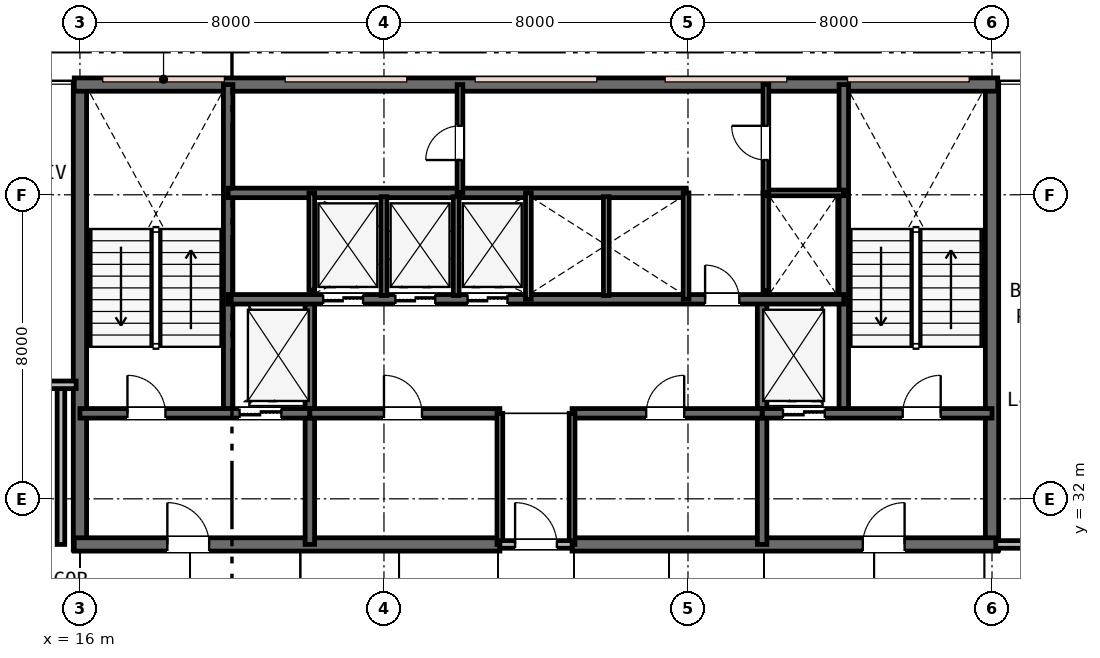
"""IFC4 building model, lengths in metres.
Left out: names, types, materials, properties, quantities, classifications, styles, units other than length and angle.
Written with IfcOpenShell. Run it as: python <this file> out.ifc"""

import sys

from ifc_helpers import new_model, si_unit, direction, frame, frame_2d, origin, place, context, subcontext, project, spatial, rectangle, extrude, element, fill, save


model = new_model("IFC4")
c1 = context("Model", 3, precision=1e-05, world=origin(), true_north=direction((0.0, 1.0)))
c2 = subcontext(c1, "Body", "Model", "MODEL_VIEW")
j1 = project(units=[si_unit("LENGTHUNIT", "METRE"), si_unit("PLANEANGLEUNIT", "RADIAN")], contexts=[c1])
p1 = place(None, origin())
s1 = spatial("IfcSite", under=j1, at=p1, CompositionType="ELEMENT")
p2 = place(p1, origin())
s2 = spatial("IfcBuilding", under=s1, at=p2, CompositionType="ELEMENT")
p3 = place(p2, frame((0.0, 0.0, 165.0)))
s3 = spatial("IfcBuildingStorey", under=s2, at=p3, CompositionType="ELEMENT", Elevation=165.0)
for number, where, z_axis, x_axis in (
    (1, (16.0, 30.65, 0.0), (0.0, 0.0, 1.0), (0.0, 1.0, 0.0)),
    (2, (40.0, 30.65, 0.0), (0.0, 0.0, 1.0), (0.0, 1.0, 0.0)),
):
    element("IfcWall", number, at=place(p3, frame(where, z_axis=z_axis, x_axis=x_axis)), inside=s3, PredefinedType="SHEAR", context=c2, shape_type="SweptSolid", body=[
        extrude(rectangle(XDim=12.3, YDim=0.35, at=frame_2d((6.15, 0.0))), origin(), (0.0, 0.0, 1.0), 3.6),
    ])
p4 = place(p3, frame((15.85, 42.9, 0.0), z_axis=(0.0, 0.0, 1.0), x_axis=(1.0, 0.0, 0.0)))
e3 = element("IfcWall", 3, at=p4, inside=s3, PredefinedType="SHEAR", context=c2, shape_type="SweptSolid", body=[
    extrude(rectangle(XDim=24.3, YDim=0.35, at=frame_2d((12.15, 0.0))), origin(), (0.0, 0.0, 1.0), 3.6),
])
p5 = place(p3, frame((15.85, 30.8, 0.0), z_axis=(0.0, 0.0, 1.0), x_axis=(1.0, 0.0, 0.0)))
e4 = element("IfcWall", 4, at=p5, inside=s3, PredefinedType="SHEAR", context=c2, shape_type="SweptSolid", body=[
    extrude(rectangle(XDim=11.2, YDim=0.35, at=frame_2d((5.6, 0.0))), origin(), (0.0, 0.0, 1.0), 3.6),
])
p6 = place(p5, frame((2.45, 0.0, 0.0)))
e5 = element("IfcOpeningElement", 5, at=p6, cuts=e4, PredefinedType="OPENING", context=c2, shape_type="SweptSolid", body=[
    extrude(rectangle(XDim=1.1, YDim=2.15, at=frame_2d((0.55, 1.075))), frame((0.0, 0.185, 0.0), z_axis=(0.0, -1.0, 0.0), x_axis=(1.0, 0.0, 0.0)), (0.0, 0.0, 1.0), 0.37),
])
p7 = place(p3, frame((28.95, 30.8, 0.0), z_axis=(0.0, 0.0, 1.0), x_axis=(1.0, 0.0, 0.0)))
e6 = element("IfcWall", 6, at=p7, inside=s3, PredefinedType="SHEAR", context=c2, shape_type="SweptSolid", body=[
    extrude(rectangle(XDim=11.2, YDim=0.35, at=frame_2d((5.6, 0.0))), origin(), (0.0, 0.0, 1.0), 3.6),
])
p8 = place(p7, frame((7.65, 0.0, 0.0)))
e7 = element("IfcOpeningElement", 7, at=p8, cuts=e6, PredefinedType="OPENING", context=c2, shape_type="SweptSolid", body=[
    extrude(rectangle(XDim=1.1, YDim=2.15, at=frame_2d((0.55, 1.075))), frame((0.0, 0.185, 0.0), z_axis=(0.0, -1.0, 0.0), x_axis=(1.0, 0.0, 0.0)), (0.0, 0.0, 1.0), 0.37),
])
for number, where, z_axis, x_axis in (
    (8, (19.9, 34.25, 0.0), (0.0, 0.0, 1.0), (0.0, 1.0, 0.0)),
    (9, (36.1, 34.25, 0.0), (0.0, 0.0, 1.0), (0.0, 1.0, 0.0)),
):
    element("IfcWall", number, at=place(p3, frame(where, z_axis=z_axis, x_axis=x_axis)), inside=s3, PredefinedType="SHEAR", context=c2, shape_type="SweptSolid", body=[
        extrude(rectangle(XDim=8.65, YDim=0.25, at=frame_2d((4.325, 0.0))), origin(), (0.0, 0.0, 1.0), 3.6),
    ])
for number, where, z_axis, x_axis in (
    (10, (22.05, 30.8, 0.0), (0.0, 0.0, 1.0), (0.0, 1.0, 0.0)),
    (11, (33.95, 30.8, 0.0), (0.0, 0.0, 1.0), (0.0, 1.0, 0.0)),
):
    element("IfcWall", number, at=place(p3, frame(where, z_axis=z_axis, x_axis=x_axis)), inside=s3, PredefinedType="SHEAR", context=c2, shape_type="SweptSolid", body=[
        extrude(rectangle(XDim=6.45, YDim=0.25, at=frame_2d((3.225, 0.0))), origin(), (0.0, 0.0, 1.0), 3.6),
    ])
p9 = place(p3, frame((16.0, 34.25, 0.0), z_axis=(0.0, 0.0, 1.0), x_axis=(1.0, 0.0, 0.0)))
e12 = element("IfcWall", 12, at=p9, inside=s3, PredefinedType="SHEAR", context=c2, shape_type="SweptSolid", body=[
    extrude(rectangle(XDim=6.05, YDim=0.25, at=frame_2d((3.025, 0.0))), origin(), (0.0, 0.0, 1.0), 3.6),
])
p10 = place(p9, frame((1.25, 0.0, 0.0)))
e13 = element("IfcOpeningElement", 13, at=p10, cuts=e12, PredefinedType="OPENING", context=c2, shape_type="SweptSolid", body=[
    extrude(rectangle(XDim=1.0, YDim=2.15, at=frame_2d((0.5, 1.075))), frame((0.0, 0.135, 0.0), z_axis=(0.0, -1.0, 0.0), x_axis=(1.0, 0.0, 0.0)), (0.0, 0.0, 1.0), 0.27),
])
p11 = place(p9, frame((4.2, 0.0, 0.0)))
e14 = element("IfcOpeningElement", 14, at=p11, cuts=e12, PredefinedType="OPENING", context=c2, shape_type="SweptSolid", body=[
    extrude(rectangle(XDim=1.1, YDim=2.15, at=frame_2d((0.55, 1.075))), frame((0.0, 0.135, 0.0), z_axis=(0.0, -1.0, 0.0), x_axis=(1.0, 0.0, 0.0)), (0.0, 0.0, 1.0), 0.27),
])
p12 = place(p3, frame((33.95, 34.25, 0.0), z_axis=(0.0, 0.0, 1.0), x_axis=(1.0, 0.0, 0.0)))
e15 = element("IfcWall", 15, at=p12, inside=s3, PredefinedType="SHEAR", context=c2, shape_type="SweptSolid", body=[
    extrude(rectangle(XDim=6.05, YDim=0.25, at=frame_2d((3.025, 0.0))), origin(), (0.0, 0.0, 1.0), 3.6),
])
p13 = place(p12, frame((3.7, 0.0, 0.0)))
e16 = element("IfcOpeningElement", 16, at=p13, cuts=e15, PredefinedType="OPENING", context=c2, shape_type="SweptSolid", body=[
    extrude(rectangle(XDim=1.0, YDim=2.15, at=frame_2d((0.5, 1.075))), frame((0.0, 0.135, 0.0), z_axis=(0.0, -1.0, 0.0), x_axis=(1.0, 0.0, 0.0)), (0.0, 0.0, 1.0), 0.27),
])
p14 = place(p12, frame((0.55, 0.0, 0.0)))
e17 = element("IfcOpeningElement", 17, at=p14, cuts=e15, PredefinedType="OPENING", context=c2, shape_type="SweptSolid", body=[
    extrude(rectangle(XDim=1.1, YDim=2.15, at=frame_2d((0.55, 1.075))), frame((0.0, 0.135, 0.0), z_axis=(0.0, -1.0, 0.0), x_axis=(1.0, 0.0, 0.0)), (0.0, 0.0, 1.0), 0.27),
])
p15 = place(p3, frame((22.05, 34.25, 0.0), z_axis=(0.0, 0.0, 1.0), x_axis=(1.0, 0.0, 0.0)))
e18 = element("IfcWall", 18, at=p15, inside=s3, PredefinedType="SHEAR", context=c2, shape_type="SweptSolid", body=[
    extrude(rectangle(XDim=5.0, YDim=0.25, at=frame_2d((2.5, 0.0))), origin(), (0.0, 0.0, 1.0), 3.6),
])
p16 = place(p15, frame((1.95, 0.0, 0.0)))
e19 = element("IfcOpeningElement", 19, at=p16, cuts=e18, PredefinedType="OPENING", context=c2, shape_type="SweptSolid", body=[
    extrude(rectangle(XDim=1.0, YDim=2.15, at=frame_2d((0.5, 1.075))), frame((0.0, 0.135, 0.0), z_axis=(0.0, -1.0, 0.0), x_axis=(1.0, 0.0, 0.0)), (0.0, 0.0, 1.0), 0.27),
])
p17 = place(p3, frame((28.95, 34.25, 0.0), z_axis=(0.0, 0.0, 1.0), x_axis=(1.0, 0.0, 0.0)))
e20 = element("IfcWall", 20, at=p17, inside=s3, PredefinedType="SHEAR", context=c2, shape_type="SweptSolid", body=[
    extrude(rectangle(XDim=5.0, YDim=0.25, at=frame_2d((2.5, 0.0))), origin(), (0.0, 0.0, 1.0), 3.6),
])
p18 = place(p17, frame((1.95, 0.0, 0.0)))
e21 = element("IfcOpeningElement", 21, at=p18, cuts=e20, PredefinedType="OPENING", context=c2, shape_type="SweptSolid", body=[
    extrude(rectangle(XDim=1.0, YDim=2.15, at=frame_2d((0.5, 1.075))), frame((0.0, 0.135, 0.0), z_axis=(0.0, -1.0, 0.0), x_axis=(1.0, 0.0, 0.0)), (0.0, 0.0, 1.0), 0.27),
])
p19 = place(p3, frame((19.9, 37.25, 0.0), z_axis=(0.0, 0.0, 1.0), x_axis=(1.0, 0.0, 0.0)))
e22 = element("IfcWall", 22, at=p19, inside=s3, PredefinedType="SHEAR", context=c2, shape_type="SweptSolid", body=[
    extrude(rectangle(XDim=16.2, YDim=0.25, at=frame_2d((8.1, 0.0))), origin(), (0.0, 0.0, 1.0), 3.6),
])
p20 = place(p19, frame((12.55, 0.0, 0.0)))
e23 = element("IfcOpeningElement", 23, at=p20, cuts=e22, PredefinedType="OPENING", context=c2, shape_type="SweptSolid", body=[
    extrude(rectangle(XDim=0.9, YDim=2.15, at=frame_2d((0.45, 1.075))), frame((0.0, 0.135, 0.0), z_axis=(0.0, -1.0, 0.0), x_axis=(1.0, 0.0, 0.0)), (0.0, 0.0, 1.0), 0.27),
])
p21 = place(p19, frame((2.5, 0.0, 0.0)))
e24 = element("IfcOpeningElement", 24, at=p21, cuts=e22, PredefinedType="OPENING", context=c2, shape_type="SweptSolid", body=[
    extrude(rectangle(XDim=1.05, YDim=2.15, at=frame_2d((0.525, 1.075))), frame((0.0, 0.135, 0.0), z_axis=(0.0, -1.0, 0.0), x_axis=(1.0, 0.0, 0.0)), (0.0, 0.0, 1.0), 0.27),
])
p22 = place(p19, frame((4.4, 0.0, 0.0)))
e25 = element("IfcOpeningElement", 25, at=p22, cuts=e22, PredefinedType="OPENING", context=c2, shape_type="SweptSolid", body=[
    extrude(rectangle(XDim=1.05, YDim=2.15, at=frame_2d((0.525, 1.075))), frame((0.0, 0.135, 0.0), z_axis=(0.0, -1.0, 0.0), x_axis=(1.0, 0.0, 0.0)), (0.0, 0.0, 1.0), 0.27),
])
p23 = place(p19, frame((6.3, 0.0, 0.0)))
e26 = element("IfcOpeningElement", 26, at=p23, cuts=e22, PredefinedType="OPENING", context=c2, shape_type="SweptSolid", body=[
    extrude(rectangle(XDim=1.05, YDim=2.15, at=frame_2d((0.525, 1.075))), frame((0.0, 0.135, 0.0), z_axis=(0.0, -1.0, 0.0), x_axis=(1.0, 0.0, 0.0)), (0.0, 0.0, 1.0), 0.27),
])
p24 = place(p3, frame((19.9, 40.05, 0.0), z_axis=(0.0, 0.0, 1.0), x_axis=(1.0, 0.0, 0.0)))
e27 = element("IfcWall", 27, at=p24, inside=s3, PredefinedType="SHEAR", context=c2, shape_type="SweptSolid", body=[
    extrude(rectangle(XDim=12.05, YDim=0.25, at=frame_2d((6.025, 0.0))), origin(), (0.0, 0.0, 1.0), 3.6),
])
for number, where, z_axis, x_axis in (
    (28, (27.05, 30.8, 0.0), (0.0, 0.0, 1.0), (0.0, 1.0, 0.0)),
    (29, (28.95, 30.8, 0.0), (0.0, 0.0, 1.0), (0.0, 1.0, 0.0)),
):
    element("IfcWall", number, at=place(p3, frame(where, z_axis=z_axis, x_axis=x_axis)), inside=s3, PredefinedType="PLUMBINGWALL", context=c2, shape_type="SweptSolid", body=[
        extrude(rectangle(XDim=3.45, YDim=0.15, at=frame_2d((1.725, 0.0))), origin(), (0.0, 0.0, 1.0), 2.96),
    ])
p25 = place(p3, frame((27.05, 30.8, 0.0), z_axis=(0.0, 0.0, 1.0), x_axis=(1.0, 0.0, 0.0)))
e30 = element("IfcWall", 30, at=p25, inside=s3, PredefinedType="PARTITIONING", context=c2, shape_type="SweptSolid", body=[
    extrude(rectangle(XDim=1.9, YDim=0.2, at=frame_2d((0.95, 0.0))), origin(), (0.0, 0.0, 1.0), 2.96),
])
p26 = place(p25, frame((0.4, 0.0, 0.0)))
e31 = element("IfcOpeningElement", 31, at=p26, cuts=e30, PredefinedType="OPENING", context=c2, shape_type="SweptSolid", body=[
    extrude(rectangle(XDim=1.1, YDim=2.15, at=frame_2d((0.55, 1.075))), frame((0.0, 0.11, 0.0), z_axis=(0.0, -1.0, 0.0), x_axis=(1.0, 0.0, 0.0)), (0.0, 0.0, 1.0), 0.22),
])
p27 = place(p3, frame((22.1, 37.49, 0.0), z_axis=(0.0, 0.0, 1.0), x_axis=(0.0, 1.0, 0.0)))
e32 = element("IfcWall", 32, at=p27, inside=s3, PredefinedType="PLUMBINGWALL", context=c2, shape_type="SweptSolid", body=[
    extrude(rectangle(XDim=2.56, YDim=0.15, at=frame_2d((1.28, 0.0))), origin(), (0.0, 0.0, 1.0), 3.33),
])
p28 = place(p3, frame((27.8, 37.25, 0.0), z_axis=(0.0, 0.0, 1.0), x_axis=(0.0, 1.0, 0.0)))
e33 = element("IfcWall", 33, at=p28, inside=s3, PredefinedType="PLUMBINGWALL", context=c2, shape_type="SweptSolid", body=[
    extrude(rectangle(XDim=2.8, YDim=0.15, at=frame_2d((1.4, 0.0))), origin(), (0.0, 0.0, 1.0), 3.33),
])
for number, where, z_axis, x_axis in (
    (34, (24.0, 37.35, 0.0), (0.0, 0.0, 1.0), (0.0, 1.0, 0.0)),
    (35, (25.9, 37.35, 0.0), (0.0, 0.0, 1.0), (0.0, 1.0, 0.0)),
):
    element("IfcWall", number, at=place(p3, frame(where, z_axis=z_axis, x_axis=x_axis)), inside=s3, PredefinedType="PLUMBINGWALL", context=c2, shape_type="SweptSolid", body=[
        extrude(rectangle(XDim=2.6, YDim=0.15, at=frame_2d((1.3, 0.0))), origin(), (0.0, 0.0, 1.0), 3.33),
    ])
p29 = place(p3, frame((31.95, 37.25, 0.0), z_axis=(0.0, 0.0, 1.0), x_axis=(0.0, 1.0, 0.0)))
e36 = element("IfcWall", 36, at=p29, inside=s3, PredefinedType="PLUMBINGWALL", context=c2, shape_type="SweptSolid", body=[
    extrude(rectangle(XDim=2.8, YDim=0.15, at=frame_2d((1.4, 0.0))), origin(), (0.0, 0.0, 1.0), 3.33),
])
p30 = place(p3, frame((29.85, 37.35, 0.0), z_axis=(0.0, 0.0, 1.0), x_axis=(0.0, 1.0, 0.0)))
e37 = element("IfcWall", 37, at=p30, inside=s3, PredefinedType="PLUMBINGWALL", context=c2, shape_type="SweptSolid", body=[
    extrude(rectangle(XDim=2.6, YDim=0.15, at=frame_2d((1.3, 0.0))), origin(), (0.0, 0.0, 1.0), 3.33),
])
p31 = place(p3, frame((34.05, 37.473, 0.0), z_axis=(0.0, 0.0, 1.0), x_axis=(0.0, 1.0, 0.0)))
e38 = element("IfcWall", 38, at=p31, inside=s3, PredefinedType="PLUMBINGWALL", context=c2, shape_type="SweptSolid", body=[
    extrude(rectangle(XDim=2.577, YDim=0.15, at=frame_2d((1.288, 0.0))), origin(), (0.0, 0.0, 1.0), 3.33),
])
p32 = place(p3, frame((34.05, 40.05, 0.0), z_axis=(0.0, 0.0, 1.0), x_axis=(1.0, 0.0, 0.0)))
e39 = element("IfcWall", 39, at=p32, inside=s3, PredefinedType="PARTITIONING", context=c2, shape_type="SweptSolid", body=[
    extrude(rectangle(XDim=2.05, YDim=0.15, at=frame_2d((1.025, 0.0))), origin(), (0.0, 0.0, 1.0), 3.33),
])
p33 = place(p3, frame((34.05, 40.05, 0.0), z_axis=(0.0, 0.0, 1.0), x_axis=(0.0, 1.0, 0.0)))
e40 = element("IfcWall", 40, at=p33, inside=s3, PredefinedType="PARTITIONING", context=c2, shape_type="SweptSolid", body=[
    extrude(rectangle(XDim=2.85, YDim=0.15, at=frame_2d((1.425, 0.0))), origin(), (0.0, 0.0, 1.0), 3.33),
])
p34 = place(p33, frame((0.865, 0.0, 0.0)))
e41 = element("IfcOpeningElement", 41, at=p34, cuts=e40, PredefinedType="OPENING", context=c2, shape_type="SweptSolid", body=[
    extrude(rectangle(XDim=0.9, YDim=2.15, at=frame_2d((0.45, 1.075))), frame((0.0, 0.085, 0.0), z_axis=(0.0, -1.0, 0.0), x_axis=(1.0, 0.0, 0.0)), (0.0, 0.0, 1.0), 0.17),
])
p35 = place(p3, frame((26.0, 40.05, 0.0), z_axis=(0.0, 0.0, 1.0), x_axis=(0.0, 1.0, 0.0)))
e42 = element("IfcWall", 42, at=p35, inside=s3, PredefinedType="PARTITIONING", context=c2, shape_type="SweptSolid", body=[
    extrude(rectangle(XDim=2.85, YDim=0.15, at=frame_2d((1.425, 0.0))), origin(), (0.0, 0.0, 1.0), 3.33),
])
p36 = place(p35, frame((0.865, 0.0, 0.0)))
e43 = element("IfcOpeningElement", 43, at=p36, cuts=e42, PredefinedType="OPENING", context=c2, shape_type="SweptSolid", body=[
    extrude(rectangle(XDim=0.9, YDim=2.15, at=frame_2d((0.45, 1.075))), frame((0.0, 0.085, 0.0), z_axis=(0.0, -1.0, 0.0), x_axis=(1.0, 0.0, 0.0)), (0.0, 0.0, 1.0), 0.17),
])
p37 = place(p3, frame((15.5, 30.8, 0.0), z_axis=(0.0, 0.0, 1.0), x_axis=(0.0, 1.0, 0.0)))
e44 = element("IfcWall", 44, at=p37, inside=s3, PredefinedType="PARTITIONING", context=c2, shape_type="SweptSolid", body=[
    extrude(rectangle(XDim=4.2, YDim=0.2, at=frame_2d((2.1, 0.0))), origin(), (0.0, 0.0, 1.0), 2.93),
])
p38 = place(p3, frame((5.1, 35.0, 0.0), z_axis=(0.0, 0.0, 1.0), x_axis=(1.0, 0.0, 0.0)))
e45 = element("IfcWall", 45, at=p38, inside=s3, PredefinedType="PARTITIONING", context=c2, shape_type="SweptSolid", body=[
    extrude(rectangle(XDim=10.8, YDim=0.2, at=frame_2d((5.4, 0.0))), origin(), (0.0, 0.0, 1.0), 3.01),
])
p39 = place(p38, frame((6.964, 0.0, 0.0)))
e46 = element("IfcOpeningElement", 46, at=p39, cuts=e45, PredefinedType="OPENING", context=c2, shape_type="SweptSolid", body=[
    extrude(rectangle(XDim=0.95, YDim=2.15, at=frame_2d((0.475, 1.075))), frame((0.0, 0.11, 0.0), z_axis=(0.0, -1.0, 0.0), x_axis=(1.0, 0.0, 0.0)), (0.0, 0.0, 1.0), 0.22),
])
p40 = place(p3, frame((40.1, 30.8, 0.0), z_axis=(0.0, 0.0, 1.0), x_axis=(1.0, 0.0, 0.0)))
e47 = element("IfcWall", 47, at=p40, inside=s3, PredefinedType="PARTITIONING", context=c2, shape_type="SweptSolid", body=[
    extrude(rectangle(XDim=4.1, YDim=0.2, at=frame_2d((2.05, 0.0))), origin(), (0.0, 0.0, 1.0), 2.93),
])
p41 = place(p40, frame((1.575, 0.0, 0.0)))
e48 = element("IfcOpeningElement", 48, at=p41, cuts=e47, PredefinedType="OPENING", context=c2, shape_type="SweptSolid", body=[
    extrude(rectangle(XDim=0.95, YDim=2.15, at=frame_2d((0.475, 1.075))), frame((0.0, 0.11, 0.0), z_axis=(0.0, -1.0, 0.0), x_axis=(1.0, 0.0, 0.0)), (0.0, 0.0, 1.0), 0.22),
])
p42 = place(p26, origin())
e49 = element("IfcDoor", 49, at=p42, inside=s3, OperationType="SINGLE_SWING_LEFT", PredefinedType="DOOR", context=c2, shape_type="SweptSolid", body=[
    extrude(rectangle(XDim=1.1, YDim=2.15, at=frame_2d((0.55, 1.075))), frame((0.0, 0.025, 0.0), z_axis=(0.0, -1.0, 0.0), x_axis=(1.0, 0.0, 0.0)), (0.0, 0.0, 1.0), 0.05),
])
fill(e31, e49)
p43 = place(p10, origin())
e50 = element("IfcDoor", 50, at=p43, inside=s3, OperationType="SINGLE_SWING_LEFT", PredefinedType="DOOR", context=c2, shape_type="SweptSolid", body=[
    extrude(rectangle(XDim=1.0, YDim=2.15, at=frame_2d((0.5, 1.075))), frame((0.0, 0.025, 0.0), z_axis=(0.0, -1.0, 0.0), x_axis=(1.0, 0.0, 0.0)), (0.0, 0.0, 1.0), 0.05),
])
fill(e13, e50)
p44 = place(p13, origin())
e51 = element("IfcDoor", 51, at=p44, inside=s3, OperationType="SINGLE_SWING_RIGHT", PredefinedType="DOOR", context=c2, shape_type="SweptSolid", body=[
    extrude(rectangle(XDim=1.0, YDim=2.15, at=frame_2d((0.5, 1.075))), frame((0.0, 0.025, 0.0), z_axis=(0.0, -1.0, 0.0), x_axis=(1.0, 0.0, 0.0)), (0.0, 0.0, 1.0), 0.05),
])
fill(e16, e51)
p45 = place(p6, origin())
e52 = element("IfcDoor", 52, at=p45, inside=s3, OperationType="SINGLE_SWING_LEFT", PredefinedType="DOOR", context=c2, shape_type="SweptSolid", body=[
    extrude(rectangle(XDim=1.1, YDim=2.15, at=frame_2d((0.55, 1.075))), frame((0.0, 0.025, 0.0), z_axis=(0.0, -1.0, 0.0), x_axis=(1.0, 0.0, 0.0)), (0.0, 0.0, 1.0), 0.05),
])
fill(e5, e52)
p46 = place(p8, origin())
e53 = element("IfcDoor", 53, at=p46, inside=s3, OperationType="SINGLE_SWING_RIGHT", PredefinedType="DOOR", context=c2, shape_type="SweptSolid", body=[
    extrude(rectangle(XDim=1.1, YDim=2.15, at=frame_2d((0.55, 1.075))), frame((0.0, 0.025, 0.0), z_axis=(0.0, -1.0, 0.0), x_axis=(1.0, 0.0, 0.0)), (0.0, 0.0, 1.0), 0.05),
])
fill(e7, e53)
p47 = place(p16, origin())
e54 = element("IfcDoor", 54, at=p47, inside=s3, OperationType="SINGLE_SWING_LEFT", PredefinedType="DOOR", context=c2, shape_type="SweptSolid", body=[
    extrude(rectangle(XDim=1.0, YDim=2.15, at=frame_2d((0.5, 1.075))), frame((0.0, 0.025, 0.0), z_axis=(0.0, -1.0, 0.0), x_axis=(1.0, 0.0, 0.0)), (0.0, 0.0, 1.0), 0.05),
])
fill(e19, e54)
p48 = place(p18, origin())
e55 = element("IfcDoor", 55, at=p48, inside=s3, OperationType="SINGLE_SWING_RIGHT", PredefinedType="DOOR", context=c2, shape_type="SweptSolid", body=[
    extrude(rectangle(XDim=1.0, YDim=2.15, at=frame_2d((0.5, 1.075))), frame((0.0, 0.025, 0.0), z_axis=(0.0, -1.0, 0.0), x_axis=(1.0, 0.0, 0.0)), (0.0, 0.0, 1.0), 0.05),
])
fill(e21, e55)
p49 = place(p20, origin())
e56 = element("IfcDoor", 56, at=p49, inside=s3, OperationType="SINGLE_SWING_LEFT", PredefinedType="DOOR", context=c2, shape_type="SweptSolid", body=[
    extrude(rectangle(XDim=0.9, YDim=2.15, at=frame_2d((0.45, 1.075))), frame((0.0, 0.025, 0.0), z_axis=(0.0, -1.0, 0.0), x_axis=(1.0, 0.0, 0.0)), (0.0, 0.0, 1.0), 0.05),
])
fill(e23, e56)
p50 = place(p34, origin())
e57 = element("IfcDoor", 57, at=p50, inside=s3, OperationType="SINGLE_SWING_RIGHT", PredefinedType="DOOR", context=c2, shape_type="SweptSolid", body=[
    extrude(rectangle(XDim=0.9, YDim=2.15, at=frame_2d((0.45, 1.075))), frame((0.0, 0.025, 0.0), z_axis=(0.0, -1.0, 0.0), x_axis=(1.0, 0.0, 0.0)), (0.0, 0.0, 1.0), 0.05),
])
fill(e41, e57)
p51 = place(p36, origin())
e58 = element("IfcDoor", 58, at=p51, inside=s3, OperationType="SINGLE_SWING_LEFT", PredefinedType="DOOR", context=c2, shape_type="SweptSolid", body=[
    extrude(rectangle(XDim=0.9, YDim=2.15, at=frame_2d((0.45, 1.075))), frame((0.0, 0.025, 0.0), z_axis=(0.0, -1.0, 0.0), x_axis=(1.0, 0.0, 0.0)), (0.0, 0.0, 1.0), 0.05),
])
fill(e43, e58)
p52 = place(p11, origin())
e59 = element("IfcDoor", 59, at=p52, inside=s3, OperationType="DOUBLE_DOOR_SLIDING", PredefinedType="DOOR", context=c2, shape_type="SweptSolid", body=[
    extrude(rectangle(XDim=1.1, YDim=2.15, at=frame_2d((0.55, 1.075))), frame((0.0, 0.025, 0.0), z_axis=(0.0, -1.0, 0.0), x_axis=(1.0, 0.0, 0.0)), (0.0, 0.0, 1.0), 0.05),
])
fill(e14, e59)
p53 = place(p14, origin())
e60 = element("IfcDoor", 60, at=p53, inside=s3, OperationType="DOUBLE_DOOR_SLIDING", PredefinedType="DOOR", context=c2, shape_type="SweptSolid", body=[
    extrude(rectangle(XDim=1.1, YDim=2.15, at=frame_2d((0.55, 1.075))), frame((0.0, 0.025, 0.0), z_axis=(0.0, -1.0, 0.0), x_axis=(1.0, 0.0, 0.0)), (0.0, 0.0, 1.0), 0.05),
])
fill(e17, e60)
p54 = place(p21, origin())
e61 = element("IfcDoor", 61, at=p54, inside=s3, OperationType="DOUBLE_DOOR_SLIDING", PredefinedType="DOOR", context=c2, shape_type="SweptSolid", body=[
    extrude(rectangle(XDim=1.05, YDim=2.15, at=frame_2d((0.525, 1.075))), frame((0.0, 0.025, 0.0), z_axis=(0.0, -1.0, 0.0), x_axis=(1.0, 0.0, 0.0)), (0.0, 0.0, 1.0), 0.05),
])
fill(e24, e61)
p55 = place(p22, origin())
e62 = element("IfcDoor", 62, at=p55, inside=s3, OperationType="DOUBLE_DOOR_SLIDING", PredefinedType="DOOR", context=c2, shape_type="SweptSolid", body=[
    extrude(rectangle(XDim=1.05, YDim=2.15, at=frame_2d((0.525, 1.075))), frame((0.0, 0.025, 0.0), z_axis=(0.0, -1.0, 0.0), x_axis=(1.0, 0.0, 0.0)), (0.0, 0.0, 1.0), 0.05),
])
fill(e25, e62)
p56 = place(p23, origin())
e63 = element("IfcDoor", 63, at=p56, inside=s3, OperationType="DOUBLE_DOOR_SLIDING", PredefinedType="DOOR", context=c2, shape_type="SweptSolid", body=[
    extrude(rectangle(XDim=1.05, YDim=2.15, at=frame_2d((0.525, 1.075))), frame((0.0, 0.025, 0.0), z_axis=(0.0, -1.0, 0.0), x_axis=(1.0, 0.0, 0.0)), (0.0, 0.0, 1.0), 0.05),
])
fill(e26, e63)
save(model, sys.argv[1])
